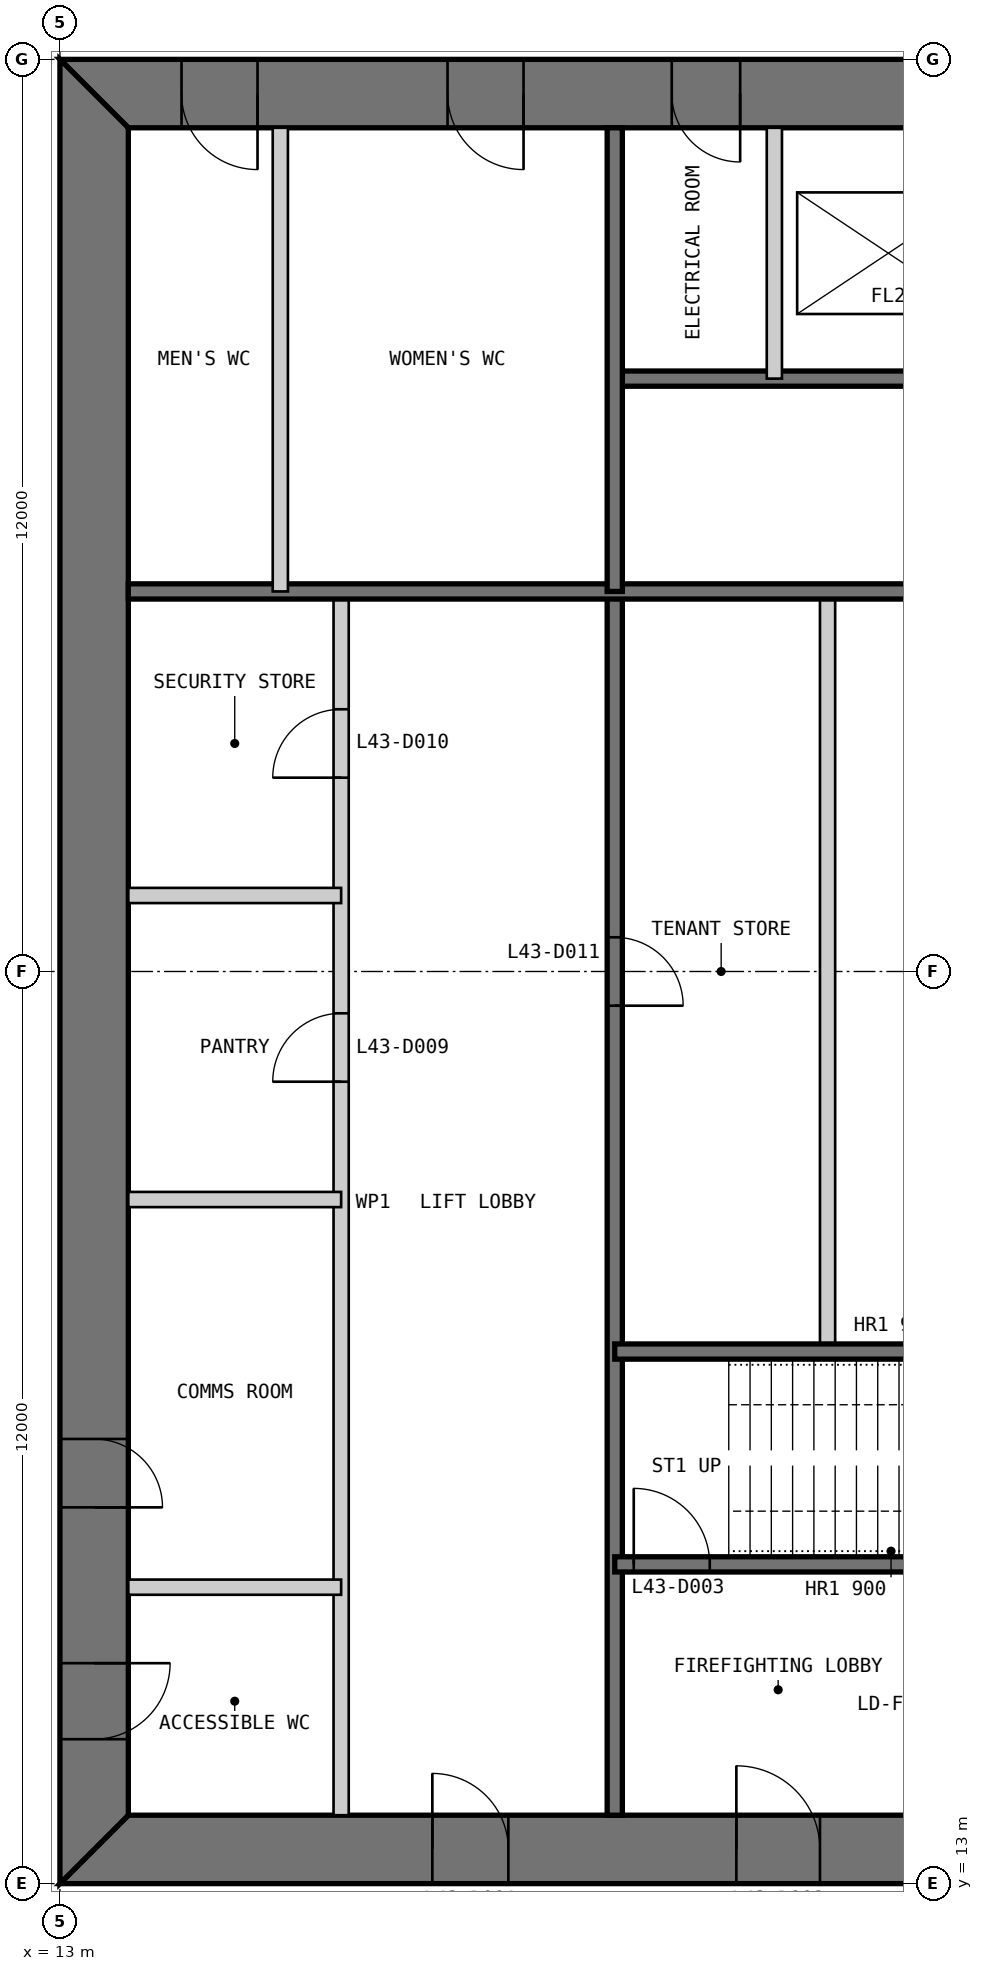
"""IFC4 building model, lengths in metres.
Left out: names, types, materials, properties, quantities, classifications, styles, units other than length and angle.
Written with IfcOpenShell. Run it as: python <this file> out.ifc"""

import sys

from ifc_helpers import new_model, si_unit, direction, frame, frame_2d, origin, place, context, subcontext, project, spatial, polyline, rectangle, outline, extrude, element, fill, save


model = new_model("IFC4")
c1 = context("Model", 3, precision=1e-05, world=origin(), true_north=direction((0.0, 1.0)))
c2 = subcontext(c1, "Body", "Model", "MODEL_VIEW")
j1 = project(units=[si_unit("LENGTHUNIT", "METRE"), si_unit("PLANEANGLEUNIT", "RADIAN")], contexts=[c1])
p1 = place(None, origin())
s1 = spatial("IfcSite", under=j1, at=p1, CompositionType="ELEMENT")
p2 = place(p1, origin())
s2 = spatial("IfcBuilding", under=s1, at=p2, CompositionType="ELEMENT")
p3 = place(p2, frame((0.0, 0.0, 185.8)))
s3 = spatial("IfcBuildingStorey", under=s2, at=p3, CompositionType="ELEMENT", Elevation=185.8)
p4 = place(p3, frame((13.0, 13.45, 0.0), z_axis=(0.0, 0.0, 1.0), x_axis=(1.0, 0.0, 0.0)))
e1 = element("IfcWall", 1, at=p4, inside=s3, PredefinedType="SHEAR", context=c2, shape_type="SweptSolid", body=[
    extrude(outline(polyline([(0.0, -0.45), (24.0, -0.45), (23.1, 0.45), (0.9, 0.45), (0.0, -0.45)])), origin(), (0.0, 0.0, 1.0), 4.0),
])
p5 = place(p4, frame((4.9, 0.0, 0.0)))
e2 = element("IfcOpeningElement", 2, at=p5, cuts=e1, PredefinedType="OPENING", context=c2, shape_type="SweptSolid", body=[
    extrude(rectangle(XDim=1.0, YDim=2.2, at=frame_2d((0.5, 1.1))), frame((0.0, 0.46, 0.0), z_axis=(0.0, -1.0, 0.0), x_axis=(1.0, 0.0, 0.0)), (0.0, 0.0, 1.0), 0.92),
])
p6 = place(p4, frame((8.9, 0.0, 0.0)))
e3 = element("IfcOpeningElement", 3, at=p6, cuts=e1, PredefinedType="OPENING", context=c2, shape_type="SweptSolid", body=[
    extrude(rectangle(XDim=1.1, YDim=2.2, at=frame_2d((0.55, 1.1))), frame((0.0, 0.46, 0.0), z_axis=(0.0, -1.0, 0.0), x_axis=(1.0, 0.0, 0.0)), (0.0, 0.0, 1.0), 0.92),
])
p7 = place(p4, frame((15.05, 0.0, 0.0)))
e4 = element("IfcOpeningElement", 4, at=p7, cuts=e1, PredefinedType="OPENING", context=c2, shape_type="SweptSolid", body=[
    extrude(rectangle(XDim=0.9, YDim=2.2, at=frame_2d((0.45, 1.1))), frame((0.0, 0.46, 0.0), z_axis=(0.0, -1.0, 0.0), x_axis=(1.0, 0.0, 0.0)), (0.0, 0.0, 1.0), 0.92),
])
p8 = place(p4, frame((17.9, 0.0, 0.0)))
e5 = element("IfcOpeningElement", 5, at=p8, cuts=e1, PredefinedType="OPENING", context=c2, shape_type="SweptSolid", body=[
    extrude(rectangle(XDim=1.0, YDim=2.2, at=frame_2d((0.5, 1.1))), frame((0.0, 0.46, 0.0), z_axis=(0.0, -1.0, 0.0), x_axis=(1.0, 0.0, 0.0)), (0.0, 0.0, 1.0), 0.92),
])
p9 = place(p4, frame((21.4, 0.0, 0.0)))
e6 = element("IfcOpeningElement", 6, at=p9, cuts=e1, PredefinedType="OPENING", context=c2, shape_type="SweptSolid", body=[
    extrude(rectangle(XDim=1.0, YDim=2.2, at=frame_2d((0.5, 1.1))), frame((0.0, 0.46, 0.0), z_axis=(0.0, -1.0, 0.0), x_axis=(1.0, 0.0, 0.0)), (0.0, 0.0, 1.0), 0.92),
])
p10 = place(p3, frame((37.0, 36.55, 0.0), z_axis=(0.0, 0.0, 1.0), x_axis=(-1.0, 0.0, 0.0)))
e7 = element("IfcWall", 7, at=p10, inside=s3, PredefinedType="SHEAR", context=c2, shape_type="SweptSolid", body=[
    extrude(outline(polyline([(0.0, -0.45), (24.0, -0.45), (23.1, 0.45), (0.9, 0.45), (0.0, -0.45)])), origin(), (0.0, 0.0, 1.0), 4.0),
])
p11 = place(p10, frame((4.9, 0.0, 0.0)))
e8 = element("IfcOpeningElement", 8, at=p11, cuts=e7, PredefinedType="OPENING", context=c2, shape_type="SweptSolid", body=[
    extrude(rectangle(XDim=1.0, YDim=2.2, at=frame_2d((0.5, 1.1))), frame((0.0, 0.46, 0.0), z_axis=(0.0, -1.0, 0.0), x_axis=(1.0, 0.0, 0.0)), (0.0, 0.0, 1.0), 0.92),
])
p12 = place(p10, frame((8.9, 0.0, 0.0)))
e9 = element("IfcOpeningElement", 9, at=p12, cuts=e7, PredefinedType="OPENING", context=c2, shape_type="SweptSolid", body=[
    extrude(rectangle(XDim=1.1, YDim=2.2, at=frame_2d((0.55, 1.1))), frame((0.0, 0.46, 0.0), z_axis=(0.0, -1.0, 0.0), x_axis=(1.0, 0.0, 0.0)), (0.0, 0.0, 1.0), 0.92),
])
p13 = place(p10, frame((15.05, 0.0, 0.0)))
e10 = element("IfcOpeningElement", 10, at=p13, cuts=e7, PredefinedType="OPENING", context=c2, shape_type="SweptSolid", body=[
    extrude(rectangle(XDim=0.9, YDim=2.2, at=frame_2d((0.45, 1.1))), frame((0.0, 0.46, 0.0), z_axis=(0.0, -1.0, 0.0), x_axis=(1.0, 0.0, 0.0)), (0.0, 0.0, 1.0), 0.92),
])
p14 = place(p10, frame((17.9, 0.0, 0.0)))
e11 = element("IfcOpeningElement", 11, at=p14, cuts=e7, PredefinedType="OPENING", context=c2, shape_type="SweptSolid", body=[
    extrude(rectangle(XDim=1.0, YDim=2.2, at=frame_2d((0.5, 1.1))), frame((0.0, 0.46, 0.0), z_axis=(0.0, -1.0, 0.0), x_axis=(1.0, 0.0, 0.0)), (0.0, 0.0, 1.0), 0.92),
])
p15 = place(p10, frame((21.4, 0.0, 0.0)))
e12 = element("IfcOpeningElement", 12, at=p15, cuts=e7, PredefinedType="OPENING", context=c2, shape_type="SweptSolid", body=[
    extrude(rectangle(XDim=1.0, YDim=2.2, at=frame_2d((0.5, 1.1))), frame((0.0, 0.46, 0.0), z_axis=(0.0, -1.0, 0.0), x_axis=(1.0, 0.0, 0.0)), (0.0, 0.0, 1.0), 0.92),
])
p16 = place(p3, frame((13.45, 36.1, 0.0), z_axis=(0.0, 0.0, 1.0), x_axis=(0.0, -1.0, 0.0)))
e13 = element("IfcWall", 13, at=p16, inside=s3, PredefinedType="SHEAR", context=c2, shape_type="SweptSolid", body=[
    extrude(outline(polyline([(-0.9, -0.45), (23.1, -0.45), (22.2, 0.45), (0.0, 0.45), (-0.9, -0.45)])), origin(), (0.0, 0.0, 1.0), 4.0),
])
p17 = place(p16, frame((20.2, 0.0, 0.0)))
e14 = element("IfcOpeningElement", 14, at=p17, cuts=e13, PredefinedType="OPENING", context=c2, shape_type="SweptSolid", body=[
    extrude(rectangle(XDim=1.0, YDim=2.2, at=frame_2d((0.5, 1.1))), frame((0.0, 0.46, 0.0), z_axis=(0.0, -1.0, 0.0), x_axis=(1.0, 0.0, 0.0)), (0.0, 0.0, 1.0), 0.92),
])
p18 = place(p16, frame((17.25, 0.0, 0.0)))
e15 = element("IfcOpeningElement", 15, at=p18, cuts=e13, PredefinedType="OPENING", context=c2, shape_type="SweptSolid", body=[
    extrude(rectangle(XDim=0.9, YDim=2.2, at=frame_2d((0.45, 1.1))), frame((0.0, 0.46, 0.0), z_axis=(0.0, -1.0, 0.0), x_axis=(1.0, 0.0, 0.0)), (0.0, 0.0, 1.0), 0.92),
])
p19 = place(p3, frame((16.7, 13.9, 0.0), z_axis=(0.0, 0.0, 1.0), x_axis=(0.0, 1.0, 0.0)))
e16 = element("IfcWall", 16, at=p19, inside=s3, PredefinedType="PARTITIONING", context=c2, shape_type="SweptSolid", body=[
    extrude(rectangle(XDim=16.1, YDim=0.2, at=frame_2d((8.05, 0.0))), origin(), (0.0, 0.0, 1.0), 3.8),
])
p20 = place(p19, frame((9.65, 0.0, 0.0)))
e17 = element("IfcOpeningElement", 17, at=p20, cuts=e16, PredefinedType="OPENING", context=c2, shape_type="SweptSolid", body=[
    extrude(rectangle(XDim=0.9, YDim=2.2, at=frame_2d((0.45, 1.1))), frame((0.0, 0.11, 0.0), z_axis=(0.0, -1.0, 0.0), x_axis=(1.0, 0.0, 0.0)), (0.0, 0.0, 1.0), 0.22),
])
p21 = place(p19, frame((13.65, 0.0, 0.0)))
e18 = element("IfcOpeningElement", 18, at=p21, cuts=e16, PredefinedType="OPENING", context=c2, shape_type="SweptSolid", body=[
    extrude(rectangle(XDim=0.9, YDim=2.2, at=frame_2d((0.45, 1.1))), frame((0.0, 0.11, 0.0), z_axis=(0.0, -1.0, 0.0), x_axis=(1.0, 0.0, 0.0)), (0.0, 0.0, 1.0), 0.22),
])
p22 = place(p3, frame((20.3, 13.9, 0.0), z_axis=(0.0, 0.0, 1.0), x_axis=(0.0, 1.0, 0.0)))
e19 = element("IfcWall", 19, at=p22, inside=s3, PredefinedType="SOLIDWALL", context=c2, shape_type="SweptSolid", body=[
    extrude(rectangle(XDim=16.1, YDim=0.2, at=frame_2d((8.05, 0.0))), origin(), (0.0, 0.0, 1.0), 3.8),
])
p23 = place(p22, frame((10.65, 0.0, 0.0)))
e20 = element("IfcOpeningElement", 20, at=p23, cuts=e19, PredefinedType="OPENING", context=c2, shape_type="SweptSolid", body=[
    extrude(rectangle(XDim=0.9, YDim=2.2, at=frame_2d((0.45, 1.1))), frame((0.0, 0.11, 0.0), z_axis=(0.0, -1.0, 0.0), x_axis=(1.0, 0.0, 0.0)), (0.0, 0.0, 1.0), 0.22),
])
p24 = place(p3, frame((23.1, 20.0, 0.0), z_axis=(0.0, 0.0, 1.0), x_axis=(0.0, 1.0, 0.0)))
e21 = element("IfcWall", 21, at=p24, inside=s3, PredefinedType="PARTITIONING", context=c2, shape_type="SweptSolid", body=[
    extrude(rectangle(XDim=10.0, YDim=0.2, at=frame_2d((5.0, 0.0))), origin(), (0.0, 0.0, 1.0), 3.8),
])
p25 = place(p3, frame((20.3, 17.2, 0.0), z_axis=(0.0, 0.0, 1.0), x_axis=(1.0, 0.0, 0.0)))
e22 = element("IfcWall", 22, at=p25, inside=s3, PredefinedType="SOLIDWALL", context=c2, shape_type="SweptSolid", body=[
    extrude(rectangle(XDim=9.4, YDim=0.2, at=frame_2d((4.7, 0.0))), origin(), (0.0, 0.0, 1.0), 3.8),
])
p26 = place(p25, frame((0.25, 0.0, 0.0)))
e23 = element("IfcOpeningElement", 23, at=p26, cuts=e22, PredefinedType="OPENING", context=c2, shape_type="SweptSolid", body=[
    extrude(rectangle(XDim=1.0, YDim=2.2, at=frame_2d((0.5, 1.1))), frame((0.0, 0.11, 0.0), z_axis=(0.0, -1.0, 0.0), x_axis=(1.0, 0.0, 0.0)), (0.0, 0.0, 1.0), 0.22),
])
p27 = place(p3, frame((20.3, 20.0, 0.0), z_axis=(0.0, 0.0, 1.0), x_axis=(1.0, 0.0, 0.0)))
e24 = element("IfcWall", 24, at=p27, inside=s3, PredefinedType="SOLIDWALL", context=c2, shape_type="SweptSolid", body=[
    extrude(rectangle(XDim=15.8, YDim=0.2, at=frame_2d((7.9, 0.0))), origin(), (0.0, 0.0, 1.0), 3.8),
])
for number, where, z_axis, x_axis in (
    (25, (13.9, 16.9, 0.0), (0.0, 0.0, 1.0), (1.0, 0.0, 0.0)),
    (26, (13.9, 22.0, 0.0), (0.0, 0.0, 1.0), (1.0, 0.0, 0.0)),
    (27, (13.9, 26.0, 0.0), (0.0, 0.0, 1.0), (1.0, 0.0, 0.0)),
):
    element("IfcWall", number, at=place(p3, frame(where, z_axis=z_axis, x_axis=x_axis)), inside=s3, PredefinedType="PARTITIONING", context=c2, shape_type="SweptSolid", body=[
        extrude(rectangle(XDim=2.8, YDim=0.2, at=frame_2d((1.4, 0.0))), origin(), (0.0, 0.0, 1.0), 3.8),
    ])
p28 = place(p3, frame((29.7, 32.8, 0.0), z_axis=(0.0, 0.0, 1.0), x_axis=(-1.0, 0.0, 0.0)))
e28 = element("IfcWall", 28, at=p28, inside=s3, PredefinedType="SOLIDWALL", context=c2, shape_type="SweptSolid", body=[
    extrude(rectangle(XDim=9.4, YDim=0.2, at=frame_2d((4.7, 0.0))), origin(), (0.0, 0.0, 1.0), 3.8),
])
p29 = place(p28, frame((0.25, 0.0, 0.0)))
e29 = element("IfcOpeningElement", 29, at=p29, cuts=e28, PredefinedType="OPENING", context=c2, shape_type="SweptSolid", body=[
    extrude(rectangle(XDim=1.0, YDim=2.2, at=frame_2d((0.5, 1.1))), frame((0.0, 0.11, 0.0), z_axis=(0.0, -1.0, 0.0), x_axis=(1.0, 0.0, 0.0)), (0.0, 0.0, 1.0), 0.22),
])
p30 = place(p3, frame((29.7, 30.0, 0.0), z_axis=(0.0, 0.0, 1.0), x_axis=(-1.0, 0.0, 0.0)))
e30 = element("IfcWall", 30, at=p30, inside=s3, PredefinedType="SOLIDWALL", context=c2, shape_type="SweptSolid", body=[
    extrude(rectangle(XDim=15.8, YDim=0.2, at=frame_2d((7.9, 0.0))), origin(), (0.0, 0.0, 1.0), 3.8),
])
p31 = place(p3, frame((22.4, 36.1, 0.0), z_axis=(0.0, 0.0, 1.0), x_axis=(0.0, -1.0, 0.0)))
e31 = element("IfcWall", 31, at=p31, inside=s3, PredefinedType="PARTITIONING", context=c2, shape_type="SweptSolid", body=[
    extrude(rectangle(XDim=3.3, YDim=0.2, at=frame_2d((1.65, 0.0))), origin(), (0.0, 0.0, 1.0), 3.8),
])
p32 = place(p3, frame((20.3, 36.1, 0.0), z_axis=(0.0, 0.0, 1.0), x_axis=(0.0, -1.0, 0.0)))
e32 = element("IfcWall", 32, at=p32, inside=s3, PredefinedType="SOLIDWALL", context=c2, shape_type="SweptSolid", body=[
    extrude(rectangle(XDim=6.1, YDim=0.2, at=frame_2d((3.05, 0.0))), origin(), (0.0, 0.0, 1.0), 3.8),
])
p33 = place(p3, frame((15.9, 36.1, 0.0), z_axis=(0.0, 0.0, 1.0), x_axis=(0.0, -1.0, 0.0)))
e33 = element("IfcWall", 33, at=p33, inside=s3, PredefinedType="PARTITIONING", context=c2, shape_type="SweptSolid", body=[
    extrude(rectangle(XDim=6.1, YDim=0.2, at=frame_2d((3.05, 0.0))), origin(), (0.0, 0.0, 1.0), 3.8),
])
p34 = place(p5, origin())
e34 = element("IfcDoor", 34, at=p34, inside=s3, OperationType="SINGLE_SWING_LEFT", PredefinedType="DOOR", context=c2, shape_type="SweptSolid", body=[
    extrude(rectangle(XDim=1.0, YDim=2.2, at=frame_2d((0.5, 1.1))), frame((0.0, 0.025, 0.0), z_axis=(0.0, -1.0, 0.0), x_axis=(1.0, 0.0, 0.0)), (0.0, 0.0, 1.0), 0.05),
    extrude(outline(polyline([(0.0, 0.0), (0.04, 0.0), (0.04, 2.16), (0.96, 2.16), (0.96, 0.0), (1.0, 0.0), (1.0, 2.2), (0.0, 2.2), (0.0, 0.0)])), frame((0.0, 0.3, 0.0), z_axis=(0.0, -1.0, 0.0), x_axis=(1.0, 0.0, 0.0)), (0.0, 0.0, 1.0), 0.6),
])
fill(e2, e34)
p35 = place(p6, origin())
e35 = element("IfcDoor", 35, at=p35, inside=s3, OperationType="SINGLE_SWING_LEFT", PredefinedType="DOOR", context=c2, shape_type="SweptSolid", body=[
    extrude(rectangle(XDim=1.1, YDim=2.2, at=frame_2d((0.55, 1.1))), frame((0.0, 0.025, 0.0), z_axis=(0.0, -1.0, 0.0), x_axis=(1.0, 0.0, 0.0)), (0.0, 0.0, 1.0), 0.05),
    extrude(outline(polyline([(0.0, 0.0), (0.04, 0.0), (0.04, 2.16), (1.06, 2.16), (1.06, 0.0), (1.1, 0.0), (1.1, 2.2), (0.0, 2.2), (0.0, 0.0)])), frame((0.0, 0.3, 0.0), z_axis=(0.0, -1.0, 0.0), x_axis=(1.0, 0.0, 0.0)), (0.0, 0.0, 1.0), 0.6),
])
fill(e3, e35)
p36 = place(p26, origin())
e36 = element("IfcDoor", 36, at=p36, inside=s3, OperationType="SINGLE_SWING_LEFT", PredefinedType="DOOR", context=c2, shape_type="SweptSolid", body=[
    extrude(rectangle(XDim=1.0, YDim=2.2, at=frame_2d((0.5, 1.1))), frame((0.0, 0.025, 0.0), z_axis=(0.0, -1.0, 0.0), x_axis=(1.0, 0.0, 0.0)), (0.0, 0.0, 1.0), 0.05),
])
fill(e23, e36)
p37 = place(p17, origin())
e37 = element("IfcDoor", 37, at=p37, inside=s3, OperationType="SINGLE_SWING_LEFT", PredefinedType="DOOR", context=c2, shape_type="SweptSolid", body=[
    extrude(rectangle(XDim=1.0, YDim=2.2, at=frame_2d((0.5, 1.1))), frame((0.0, 0.025, 0.0), z_axis=(0.0, -1.0, 0.0), x_axis=(1.0, 0.0, 0.0)), (0.0, 0.0, 1.0), 0.05),
    extrude(outline(polyline([(0.0, 0.0), (0.04, 0.0), (0.04, 2.16), (0.96, 2.16), (0.96, 0.0), (1.0, 0.0), (1.0, 2.2), (0.0, 2.2), (0.0, 0.0)])), frame((0.0, 0.3, 0.0), z_axis=(0.0, -1.0, 0.0), x_axis=(1.0, 0.0, 0.0)), (0.0, 0.0, 1.0), 0.6),
])
fill(e14, e37)
p38 = place(p18, origin())
e38 = element("IfcDoor", 38, at=p38, inside=s3, OperationType="SINGLE_SWING_RIGHT", PredefinedType="DOOR", context=c2, shape_type="SweptSolid", body=[
    extrude(rectangle(XDim=0.9, YDim=2.2, at=frame_2d((0.45, 1.1))), frame((0.0, 0.025, 0.0), z_axis=(0.0, -1.0, 0.0), x_axis=(1.0, 0.0, 0.0)), (0.0, 0.0, 1.0), 0.05),
    extrude(outline(polyline([(0.0, 0.0), (0.04, 0.0), (0.04, 2.16), (0.86, 2.16), (0.86, 0.0), (0.9, 0.0), (0.9, 2.2), (0.0, 2.2), (0.0, 0.0)])), frame((0.0, 0.3, 0.0), z_axis=(0.0, -1.0, 0.0), x_axis=(1.0, 0.0, 0.0)), (0.0, 0.0, 1.0), 0.6),
])
fill(e15, e38)
p39 = place(p20, origin())
e39 = element("IfcDoor", 39, at=p39, inside=s3, OperationType="SINGLE_SWING_LEFT", PredefinedType="DOOR", context=c2, shape_type="SweptSolid", body=[
    extrude(rectangle(XDim=0.9, YDim=2.2, at=frame_2d((0.45, 1.1))), frame((0.0, 0.025, 0.0), z_axis=(0.0, -1.0, 0.0), x_axis=(1.0, 0.0, 0.0)), (0.0, 0.0, 1.0), 0.05),
])
fill(e17, e39)
p40 = place(p21, origin())
e40 = element("IfcDoor", 40, at=p40, inside=s3, OperationType="SINGLE_SWING_LEFT", PredefinedType="DOOR", context=c2, shape_type="SweptSolid", body=[
    extrude(rectangle(XDim=0.9, YDim=2.2, at=frame_2d((0.45, 1.1))), frame((0.0, 0.025, 0.0), z_axis=(0.0, -1.0, 0.0), x_axis=(1.0, 0.0, 0.0)), (0.0, 0.0, 1.0), 0.05),
])
fill(e18, e40)
p41 = place(p23, frame((0.9, 0.0, 0.0), z_axis=(0.0, 0.0, 1.0), x_axis=(-1.0, 0.0, 0.0)))
e41 = element("IfcDoor", 41, at=p41, inside=s3, OperationType="SINGLE_SWING_RIGHT", PredefinedType="DOOR", context=c2, shape_type="SweptSolid", body=[
    extrude(rectangle(XDim=0.9, YDim=2.2, at=frame_2d((0.45, 1.1))), frame((0.0, 0.025, 0.0), z_axis=(0.0, -1.0, 0.0), x_axis=(1.0, 0.0, 0.0)), (0.0, 0.0, 1.0), 0.05),
])
fill(e20, e41)
p42 = place(p13, origin())
e42 = element("IfcDoor", 42, at=p42, inside=s3, OperationType="SINGLE_SWING_LEFT", PredefinedType="DOOR", context=c2, shape_type="SweptSolid", body=[
    extrude(rectangle(XDim=0.9, YDim=2.2, at=frame_2d((0.45, 1.1))), frame((0.0, 0.025, 0.0), z_axis=(0.0, -1.0, 0.0), x_axis=(1.0, 0.0, 0.0)), (0.0, 0.0, 1.0), 0.05),
    extrude(outline(polyline([(0.0, 0.0), (0.04, 0.0), (0.04, 2.16), (0.86, 2.16), (0.86, 0.0), (0.9, 0.0), (0.9, 2.2), (0.0, 2.2), (0.0, 0.0)])), frame((0.0, 0.3, 0.0), z_axis=(0.0, -1.0, 0.0), x_axis=(1.0, 0.0, 0.0)), (0.0, 0.0, 1.0), 0.6),
])
fill(e10, e42)
p43 = place(p14, origin())
e43 = element("IfcDoor", 43, at=p43, inside=s3, OperationType="SINGLE_SWING_LEFT", PredefinedType="DOOR", context=c2, shape_type="SweptSolid", body=[
    extrude(rectangle(XDim=1.0, YDim=2.2, at=frame_2d((0.5, 1.1))), frame((0.0, 0.025, 0.0), z_axis=(0.0, -1.0, 0.0), x_axis=(1.0, 0.0, 0.0)), (0.0, 0.0, 1.0), 0.05),
    extrude(outline(polyline([(0.0, 0.0), (0.04, 0.0), (0.04, 2.16), (0.96, 2.16), (0.96, 0.0), (1.0, 0.0), (1.0, 2.2), (0.0, 2.2), (0.0, 0.0)])), frame((0.0, 0.3, 0.0), z_axis=(0.0, -1.0, 0.0), x_axis=(1.0, 0.0, 0.0)), (0.0, 0.0, 1.0), 0.6),
])
fill(e11, e43)
p44 = place(p15, origin())
e44 = element("IfcDoor", 44, at=p44, inside=s3, OperationType="SINGLE_SWING_LEFT", PredefinedType="DOOR", context=c2, shape_type="SweptSolid", body=[
    extrude(rectangle(XDim=1.0, YDim=2.2, at=frame_2d((0.5, 1.1))), frame((0.0, 0.025, 0.0), z_axis=(0.0, -1.0, 0.0), x_axis=(1.0, 0.0, 0.0)), (0.0, 0.0, 1.0), 0.05),
    extrude(outline(polyline([(0.0, 0.0), (0.04, 0.0), (0.04, 2.16), (0.96, 2.16), (0.96, 0.0), (1.0, 0.0), (1.0, 2.2), (0.0, 2.2), (0.0, 0.0)])), frame((0.0, 0.3, 0.0), z_axis=(0.0, -1.0, 0.0), x_axis=(1.0, 0.0, 0.0)), (0.0, 0.0, 1.0), 0.6),
])
fill(e12, e44)
save(model, sys.argv[1])
